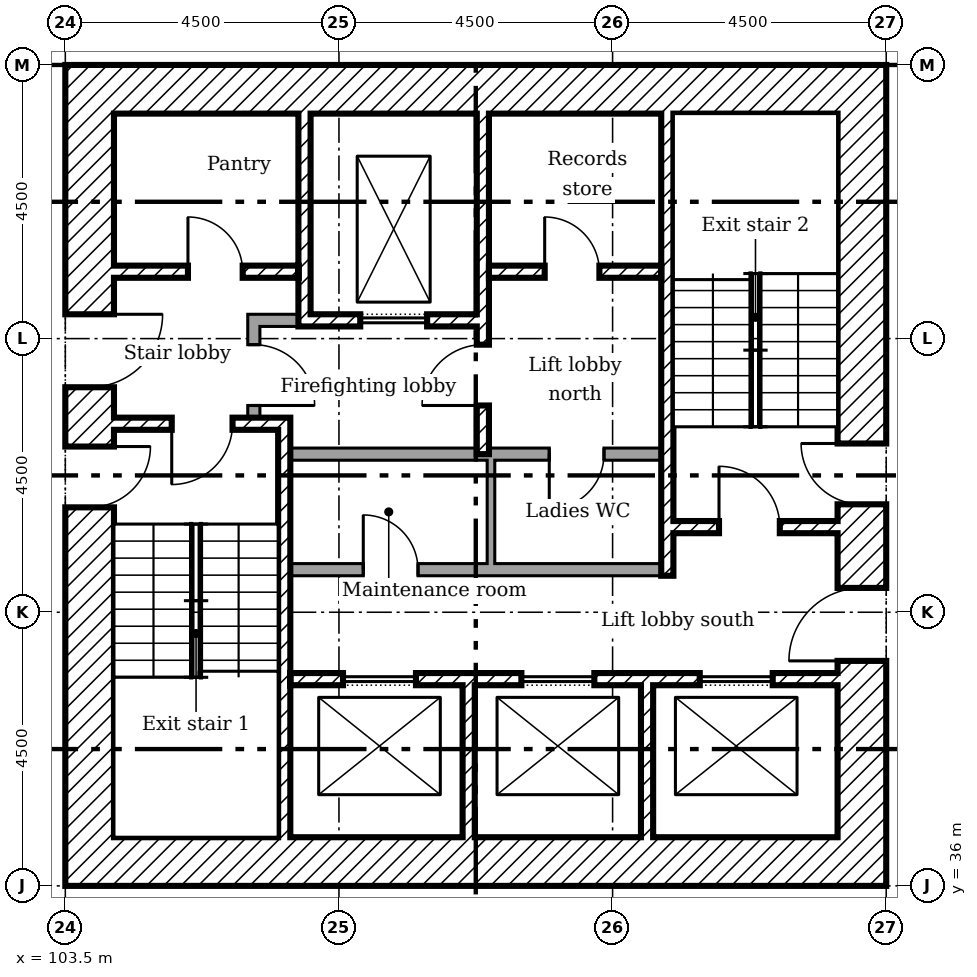
"""IFC4 building model, lengths in metres.
Left out: names, types, materials, properties, quantities, classifications, styles, units other than length and angle.
Written with IfcOpenShell. Run it as: python <this file> out.ifc"""

import sys

from ifc_helpers import new_model, si_unit, direction, frame, frame_2d, origin, place, context, subcontext, project, spatial, rectangle, extrude, element, fill, save


model = new_model("IFC4")
c1 = context("Model", 3, precision=1e-05, world=origin(), true_north=direction((0.0, 1.0)))
c2 = subcontext(c1, "Body", "Model", "MODEL_VIEW")
j1 = project(units=[si_unit("LENGTHUNIT", "METRE"), si_unit("PLANEANGLEUNIT", "RADIAN")], contexts=[c1])
p1 = place(None, origin())
s1 = spatial("IfcSite", under=j1, at=p1, CompositionType="ELEMENT")
p2 = place(p1, origin())
s2 = spatial("IfcBuilding", under=s1, at=p2, CompositionType="ELEMENT")
p3 = place(p2, frame((0.0, 0.0, 79.8)))
s3 = spatial("IfcBuildingStorey", under=s2, at=p3, CompositionType="ELEMENT", Elevation=79.8)
p4 = place(p3, frame((116.6, 36.0, 0.0), z_axis=(0.0, 0.0, 1.0), x_axis=(0.0, 1.0, 0.0)))
e1 = element("IfcWall", 1, at=p4, inside=s3, PredefinedType="SHEAR", context=c2, shape_type="SweptSolid", body=[
    extrude(rectangle(XDim=13.5, YDim=0.8, at=frame_2d((6.75, 0.0))), origin(), (0.0, 0.0, 1.0), 3.35),
])
p5 = place(p4, frame((3.7, 0.0, 0.0)))
e2 = element("IfcOpeningElement", 2, at=p5, cuts=e1, PredefinedType="OPENING", context=c2, shape_type="SweptSolid", body=[
    extrude(rectangle(XDim=1.2, YDim=2.1, at=frame_2d((0.6, 1.05))), frame((0.0, 0.41, 0.0), z_axis=(0.0, -1.0, 0.0), x_axis=(1.0, 0.0, 0.0)), (0.0, 0.0, 1.0), 0.82),
])
p6 = place(p4, frame((6.275, 0.0, 0.0)))
e3 = element("IfcOpeningElement", 3, at=p6, cuts=e1, PredefinedType="OPENING", context=c2, shape_type="SweptSolid", body=[
    extrude(rectangle(XDim=1.0, YDim=2.1, at=frame_2d((0.5, 1.05))), frame((0.0, 0.41, 0.0), z_axis=(0.0, -1.0, 0.0), x_axis=(1.0, 0.0, 0.0)), (0.0, 0.0, 1.0), 0.82),
])
for number, where in (
    (4, (104.3, 49.1, 0.0)),
    (5, (104.3, 36.4, 0.0)),
):
    element("IfcWall", number, at=place(p3, frame(where)), inside=s3, PredefinedType="SHEAR", context=c2, shape_type="SweptSolid", body=[
        extrude(rectangle(XDim=11.9, YDim=0.8, at=frame_2d((5.95, 0.0))), origin(), (0.0, 0.0, 1.0), 3.35),
    ])
p7 = place(p3, frame((103.9, 36.0, 0.0), z_axis=(0.0, 0.0, 1.0), x_axis=(0.0, 1.0, 0.0)))
e6 = element("IfcWall", 6, at=p7, inside=s3, PredefinedType="SHEAR", context=c2, shape_type="SweptSolid", body=[
    extrude(rectangle(XDim=13.5, YDim=0.8, at=frame_2d((6.75, 0.0))), origin(), (0.0, 0.0, 1.0), 3.35),
])
p8 = place(p7, frame((8.2, 0.0, 0.0)))
e7 = element("IfcOpeningElement", 7, at=p8, cuts=e6, PredefinedType="OPENING", context=c2, shape_type="SweptSolid", body=[
    extrude(rectangle(XDim=1.2, YDim=2.1, at=frame_2d((0.6, 1.05))), frame((0.0, 0.41, 0.0), z_axis=(0.0, -1.0, 0.0), x_axis=(1.0, 0.0, 0.0)), (0.0, 0.0, 1.0), 0.82),
])
p9 = place(p7, frame((6.225, 0.0, 0.0)))
e8 = element("IfcOpeningElement", 8, at=p9, cuts=e6, PredefinedType="OPENING", context=c2, shape_type="SweptSolid", body=[
    extrude(rectangle(XDim=1.0, YDim=2.1, at=frame_2d((0.5, 1.05))), frame((0.0, 0.41, 0.0), z_axis=(0.0, -1.0, 0.0), x_axis=(1.0, 0.0, 0.0)), (0.0, 0.0, 1.0), 0.82),
])
p10 = place(p3, frame((107.433, 48.7, 0.0), z_axis=(0.0, 0.0, 1.0), x_axis=(0.0, -1.0, 0.0)))
e9 = element("IfcWall", 9, at=p10, inside=s3, PredefinedType="SHEAR", context=c2, shape_type="SweptSolid", body=[
    extrude(rectangle(XDim=3.5, YDim=0.2, at=frame_2d((1.75, 0.0))), origin(), (0.0, 0.0, 1.0), 3.35),
])
p11 = place(p3, frame((110.367, 48.7, 0.0), z_axis=(0.0, 0.0, 1.0), x_axis=(0.0, -1.0, 0.0)))
e10 = element("IfcWall", 10, at=p11, inside=s3, PredefinedType="SHEAR", context=c2, shape_type="SweptSolid", body=[
    extrude(rectangle(XDim=5.6, YDim=0.2, at=frame_2d((2.8, 0.0))), origin(), (0.0, 0.0, 1.0), 3.35),
])
p12 = place(p11, frame((3.8, 0.0, 0.0)))
e11 = element("IfcOpeningElement", 11, at=p12, cuts=e10, PredefinedType="OPENING", context=c2, shape_type="SweptSolid", body=[
    extrude(rectangle(XDim=1.0, YDim=2.1, at=frame_2d((0.5, 1.05))), frame((0.0, 0.11, 0.0), z_axis=(0.0, -1.0, 0.0), x_axis=(1.0, 0.0, 0.0)), (0.0, 0.0, 1.0), 0.22),
])
for number, where, z_axis, x_axis in (
    (12, (110.133, 36.8, 0.0), (0.0, 0.0, 1.0), (0.0, 1.0, 0.0)),
    (13, (113.067, 36.8, 0.0), (0.0, 0.0, 1.0), (0.0, 1.0, 0.0)),
):
    element("IfcWall", number, at=place(p3, frame(where, z_axis=z_axis, x_axis=x_axis)), inside=s3, PredefinedType="SHEAR", context=c2, shape_type="SweptSolid", body=[
        extrude(rectangle(XDim=2.5, YDim=0.2, at=frame_2d((1.25, 0.0))), origin(), (0.0, 0.0, 1.0), 3.35),
    ])
p13 = place(p3, frame((106.5, 45.3, 0.0)))
e14 = element("IfcWall", 14, at=p13, inside=s3, PredefinedType="PARTITIONING", context=c2, shape_type="SweptSolid", body=[
    extrude(rectangle(XDim=0.833, YDim=0.2, at=frame_2d((0.417, 0.0))), origin(), (0.0, 0.0, 1.0), 3.35),
])
p14 = place(p3, frame((106.6, 43.7, 0.0), z_axis=(0.0, 0.0, 1.0), x_axis=(0.0, 1.0, 0.0)))
e15 = element("IfcWall", 15, at=p14, inside=s3, PredefinedType="PARTITIONING", context=c2, shape_type="SweptSolid", body=[
    extrude(rectangle(XDim=1.5, YDim=0.2, at=frame_2d((0.75, 0.0))), origin(), (0.0, 0.0, 1.0), 3.35),
])
p15 = place(p14, frame((0.2, 0.0, 0.0)))
e16 = element("IfcOpeningElement", 16, at=p15, cuts=e15, PredefinedType="OPENING", context=c2, shape_type="SweptSolid", body=[
    extrude(rectangle(XDim=1.0, YDim=2.1, at=frame_2d((0.5, 1.05))), frame((0.0, 0.11, 0.0), z_axis=(0.0, -1.0, 0.0), x_axis=(1.0, 0.0, 0.0)), (0.0, 0.0, 1.0), 0.22),
])
p16 = place(p3, frame((104.3, 46.1, 0.0)))
e17 = element("IfcWall", 17, at=p16, inside=s3, PredefinedType="SHEAR", context=c2, shape_type="SweptSolid", body=[
    extrude(rectangle(XDim=3.033, YDim=0.2, at=frame_2d((1.517, 0.0))), origin(), (0.0, 0.0, 1.0), 3.35),
])
p17 = place(p16, frame((1.217, 0.0, 0.0)))
e18 = element("IfcOpeningElement", 18, at=p17, cuts=e17, PredefinedType="OPENING", context=c2, shape_type="SweptSolid", body=[
    extrude(rectangle(XDim=0.9, YDim=2.1, at=frame_2d((0.45, 1.05))), frame((0.0, 0.11, 0.0), z_axis=(0.0, -1.0, 0.0), x_axis=(1.0, 0.0, 0.0)), (0.0, 0.0, 1.0), 0.22),
])
p18 = place(p3, frame((110.467, 46.1, 0.0)))
e19 = element("IfcWall", 19, at=p18, inside=s3, PredefinedType="SHEAR", context=c2, shape_type="SweptSolid", body=[
    extrude(rectangle(XDim=2.833, YDim=0.2, at=frame_2d((1.417, 0.0))), origin(), (0.0, 0.0, 1.0), 3.35),
])
p19 = place(p18, frame((0.917, 0.0, 0.0)))
e20 = element("IfcOpeningElement", 20, at=p19, cuts=e19, PredefinedType="OPENING", context=c2, shape_type="SweptSolid", body=[
    extrude(rectangle(XDim=0.9, YDim=2.1, at=frame_2d((0.45, 1.05))), frame((0.0, 0.11, 0.0), z_axis=(0.0, -1.0, 0.0), x_axis=(1.0, 0.0, 0.0)), (0.0, 0.0, 1.0), 0.22),
])
p20 = place(p3, frame((107.533, 45.3, 0.0)))
e21 = element("IfcWall", 21, at=p20, inside=s3, PredefinedType="SHEAR", context=c2, shape_type="SweptSolid", body=[
    extrude(rectangle(XDim=2.733, YDim=0.2, at=frame_2d((1.367, 0.0))), origin(), (0.0, 0.0, 1.0), 3.35),
])
p21 = place(p20, frame((0.817, 0.0, 0.0)))
e22 = element("IfcOpeningElement", 22, at=p21, cuts=e21, PredefinedType="OPENING", context=c2, shape_type="SweptSolid", body=[
    extrude(rectangle(XDim=1.1, YDim=2.1, at=frame_2d((0.55, 1.05))), frame((0.0, 0.11, 0.0), z_axis=(0.0, -1.0, 0.0), x_axis=(1.0, 0.0, 0.0)), (0.0, 0.0, 1.0), 0.22),
])
p22 = place(p3, frame((107.2, 39.4, 0.0)))
e23 = element("IfcWall", 23, at=p22, inside=s3, PredefinedType="SHEAR", context=c2, shape_type="SweptSolid", body=[
    extrude(rectangle(XDim=9.0, YDim=0.2, at=frame_2d((4.5, 0.0))), origin(), (0.0, 0.0, 1.0), 3.35),
])
p23 = place(p22, frame((0.867, 0.0, 0.0)))
e24 = element("IfcOpeningElement", 24, at=p23, cuts=e23, PredefinedType="OPENING", context=c2, shape_type="SweptSolid", body=[
    extrude(rectangle(XDim=1.2, YDim=2.1, at=frame_2d((0.6, 1.05))), frame((0.0, 0.11, 0.0), z_axis=(0.0, -1.0, 0.0), x_axis=(1.0, 0.0, 0.0)), (0.0, 0.0, 1.0), 0.22),
])
p24 = place(p22, frame((3.8, 0.0, 0.0)))
e25 = element("IfcOpeningElement", 25, at=p24, cuts=e23, PredefinedType="OPENING", context=c2, shape_type="SweptSolid", body=[
    extrude(rectangle(XDim=1.2, YDim=2.1, at=frame_2d((0.6, 1.05))), frame((0.0, 0.11, 0.0), z_axis=(0.0, -1.0, 0.0), x_axis=(1.0, 0.0, 0.0)), (0.0, 0.0, 1.0), 0.22),
])
p25 = place(p22, frame((6.733, 0.0, 0.0)))
e26 = element("IfcOpeningElement", 26, at=p25, cuts=e23, PredefinedType="OPENING", context=c2, shape_type="SweptSolid", body=[
    extrude(rectangle(XDim=1.2, YDim=2.1, at=frame_2d((0.6, 1.05))), frame((0.0, 0.11, 0.0), z_axis=(0.0, -1.0, 0.0), x_axis=(1.0, 0.0, 0.0)), (0.0, 0.0, 1.0), 0.22),
])
p26 = place(p3, frame((107.1, 36.8, 0.0), z_axis=(0.0, 0.0, 1.0), x_axis=(0.0, 1.0, 0.0)))
e27 = element("IfcWall", 27, at=p26, inside=s3, PredefinedType="SHEAR", context=c2, shape_type="SweptSolid", body=[
    extrude(rectangle(XDim=6.9, YDim=0.2, at=frame_2d((3.45, 0.0))), origin(), (0.0, 0.0, 1.0), 3.35),
])
p27 = place(p3, frame((104.3, 43.6, 0.0)))
e28 = element("IfcWall", 28, at=p27, inside=s3, PredefinedType="SHEAR", context=c2, shape_type="SweptSolid", body=[
    extrude(rectangle(XDim=2.7, YDim=0.2, at=frame_2d((1.35, 0.0))), origin(), (0.0, 0.0, 1.0), 3.35),
])
p28 = place(p27, frame((0.95, 0.0, 0.0)))
e29 = element("IfcOpeningElement", 29, at=p28, cuts=e28, PredefinedType="OPENING", context=c2, shape_type="SweptSolid", body=[
    extrude(rectangle(XDim=1.0, YDim=2.1, at=frame_2d((0.5, 1.05))), frame((0.0, 0.11, 0.0), z_axis=(0.0, -1.0, 0.0), x_axis=(1.0, 0.0, 0.0)), (0.0, 0.0, 1.0), 0.22),
])
p29 = place(p3, frame((113.5, 41.9, 0.0)))
e30 = element("IfcWall", 30, at=p29, inside=s3, PredefinedType="SHEAR", context=c2, shape_type="SweptSolid", body=[
    extrude(rectangle(XDim=2.7, YDim=0.2, at=frame_2d((1.35, 0.0))), origin(), (0.0, 0.0, 1.0), 3.35),
])
p30 = place(p29, frame((0.75, 0.0, 0.0)))
e31 = element("IfcOpeningElement", 31, at=p30, cuts=e30, PredefinedType="OPENING", context=c2, shape_type="SweptSolid", body=[
    extrude(rectangle(XDim=1.0, YDim=2.1, at=frame_2d((0.5, 1.05))), frame((0.0, 0.11, 0.0), z_axis=(0.0, -1.0, 0.0), x_axis=(1.0, 0.0, 0.0)), (0.0, 0.0, 1.0), 0.22),
])
p31 = place(p3, frame((113.4, 41.1, 0.0), z_axis=(0.0, 0.0, 1.0), x_axis=(0.0, 1.0, 0.0)))
e32 = element("IfcWall", 32, at=p31, inside=s3, PredefinedType="SHEAR", context=c2, shape_type="SweptSolid", body=[
    extrude(rectangle(XDim=7.6, YDim=0.2, at=frame_2d((3.8, 0.0))), origin(), (0.0, 0.0, 1.0), 3.35),
])
p32 = place(p3, frame((107.2, 43.1, 0.0)))
e33 = element("IfcWall", 33, at=p32, inside=s3, PredefinedType="PARTITIONING", context=c2, shape_type="SweptSolid", body=[
    extrude(rectangle(XDim=6.1, YDim=0.2, at=frame_2d((3.05, 0.0))), origin(), (0.0, 0.0, 1.0), 3.35),
])
p33 = place(p32, frame((4.259, 0.0, 0.0)))
e34 = element("IfcOpeningElement", 34, at=p33, cuts=e33, PredefinedType="OPENING", context=c2, shape_type="SweptSolid", body=[
    extrude(rectangle(XDim=0.9, YDim=2.1, at=frame_2d((0.45, 1.05))), frame((0.0, 0.11, 0.0), z_axis=(0.0, -1.0, 0.0), x_axis=(1.0, 0.0, 0.0)), (0.0, 0.0, 1.0), 0.22),
])
p34 = place(p3, frame((107.2, 41.2, 0.0)))
e35 = element("IfcWall", 35, at=p34, inside=s3, PredefinedType="PARTITIONING", context=c2, shape_type="SweptSolid", body=[
    extrude(rectangle(XDim=6.1, YDim=0.2, at=frame_2d((3.05, 0.0))), origin(), (0.0, 0.0, 1.0), 3.35),
])
p35 = place(p34, frame((1.2, 0.0, 0.0)))
e36 = element("IfcOpeningElement", 36, at=p35, cuts=e35, PredefinedType="OPENING", context=c2, shape_type="SweptSolid", body=[
    extrude(rectangle(XDim=0.9, YDim=2.1, at=frame_2d((0.45, 1.05))), frame((0.0, 0.11, 0.0), z_axis=(0.0, -1.0, 0.0), x_axis=(1.0, 0.0, 0.0)), (0.0, 0.0, 1.0), 0.22),
])
p36 = place(p3, frame((110.5, 41.3, 0.0), z_axis=(0.0, 0.0, 1.0), x_axis=(0.0, 1.0, 0.0)))
e37 = element("IfcWall", 37, at=p36, inside=s3, PredefinedType="PARTITIONING", context=c2, shape_type="SweptSolid", body=[
    extrude(rectangle(XDim=1.7, YDim=0.125, at=frame_2d((0.85, 0.0))), origin(), (0.0, 0.0, 1.0), 3.35),
])
p37 = place(p8, frame((1.2, 0.0, 0.0), x_axis=(-1.0, 0.0, 0.0)))
e38 = element("IfcDoor", 38, at=p37, inside=s3, OperationType="SINGLE_SWING_RIGHT", PredefinedType="DOOR", context=c2, shape_type="SweptSolid", body=[
    extrude(rectangle(XDim=1.2, YDim=2.1, at=frame_2d((0.6, 1.05))), frame((0.0, 0.025, 0.0), z_axis=(0.0, -1.0, 0.0), x_axis=(1.0, 0.0, 0.0)), (0.0, 0.0, 1.0), 0.05),
])
fill(e7, e38)
p38 = place(p5, origin())
e39 = element("IfcDoor", 39, at=p38, inside=s3, OperationType="SINGLE_SWING_RIGHT", PredefinedType="DOOR", context=c2, shape_type="SweptSolid", body=[
    extrude(rectangle(XDim=1.2, YDim=2.1, at=frame_2d((0.6, 1.05))), frame((0.0, 0.025, 0.0), z_axis=(0.0, -1.0, 0.0), x_axis=(1.0, 0.0, 0.0)), (0.0, 0.0, 1.0), 0.05),
])
fill(e2, e39)
p39 = place(p28, frame((1.0, 0.0, 0.0), x_axis=(-1.0, 0.0, 0.0)))
e40 = element("IfcDoor", 40, at=p39, inside=s3, OperationType="SINGLE_SWING_LEFT", PredefinedType="DOOR", context=c2, shape_type="SweptSolid", body=[
    extrude(rectangle(XDim=1.0, YDim=2.1, at=frame_2d((0.5, 1.05))), frame((0.0, 0.025, 0.0), z_axis=(0.0, -1.0, 0.0), x_axis=(1.0, 0.0, 0.0)), (0.0, 0.0, 1.0), 0.05),
])
fill(e29, e40)
p40 = place(p9, frame((1.0, 0.0, 0.0), x_axis=(-1.0, 0.0, 0.0)))
e41 = element("IfcDoor", 41, at=p40, inside=s3, OperationType="SINGLE_SWING_RIGHT", PredefinedType="DOOR", context=c2, shape_type="SweptSolid", body=[
    extrude(rectangle(XDim=1.0, YDim=2.1, at=frame_2d((0.5, 1.05))), frame((0.0, 0.025, 0.0), z_axis=(0.0, -1.0, 0.0), x_axis=(1.0, 0.0, 0.0)), (0.0, 0.0, 1.0), 0.05),
])
fill(e8, e41)
p41 = place(p30, origin())
e42 = element("IfcDoor", 42, at=p41, inside=s3, OperationType="SINGLE_SWING_RIGHT", PredefinedType="DOOR", context=c2, shape_type="SweptSolid", body=[
    extrude(rectangle(XDim=1.0, YDim=2.1, at=frame_2d((0.5, 1.05))), frame((0.0, 0.025, 0.0), z_axis=(0.0, -1.0, 0.0), x_axis=(1.0, 0.0, 0.0)), (0.0, 0.0, 1.0), 0.05),
])
fill(e31, e42)
p42 = place(p6, origin())
e43 = element("IfcDoor", 43, at=p42, inside=s3, OperationType="SINGLE_SWING_LEFT", PredefinedType="DOOR", context=c2, shape_type="SweptSolid", body=[
    extrude(rectangle(XDim=1.0, YDim=2.1, at=frame_2d((0.5, 1.05))), frame((0.0, 0.025, 0.0), z_axis=(0.0, -1.0, 0.0), x_axis=(1.0, 0.0, 0.0)), (0.0, 0.0, 1.0), 0.05),
])
fill(e3, e43)
p43 = place(p12, frame((1.0, 0.0, 0.0), x_axis=(-1.0, 0.0, 0.0)))
e44 = element("IfcDoor", 44, at=p43, inside=s3, OperationType="SINGLE_SWING_RIGHT", PredefinedType="DOOR", context=c2, shape_type="SweptSolid", body=[
    extrude(rectangle(XDim=1.0, YDim=2.1, at=frame_2d((0.5, 1.05))), frame((0.0, 0.025, 0.0), z_axis=(0.0, -1.0, 0.0), x_axis=(1.0, 0.0, 0.0)), (0.0, 0.0, 1.0), 0.05),
])
fill(e11, e44)
p44 = place(p15, frame((1.0, 0.0, 0.0), x_axis=(-1.0, 0.0, 0.0)))
e45 = element("IfcDoor", 45, at=p44, inside=s3, OperationType="SINGLE_SWING_LEFT", PredefinedType="DOOR", context=c2, shape_type="SweptSolid", body=[
    extrude(rectangle(XDim=1.0, YDim=2.1, at=frame_2d((0.5, 1.05))), frame((0.0, 0.025, 0.0), z_axis=(0.0, -1.0, 0.0), x_axis=(1.0, 0.0, 0.0)), (0.0, 0.0, 1.0), 0.05),
])
fill(e16, e45)
p45 = place(p17, origin())
e46 = element("IfcDoor", 46, at=p45, inside=s3, OperationType="SINGLE_SWING_RIGHT", PredefinedType="DOOR", context=c2, shape_type="SweptSolid", body=[
    extrude(rectangle(XDim=0.9, YDim=2.1, at=frame_2d((0.45, 1.05))), frame((0.0, 0.025, 0.0), z_axis=(0.0, -1.0, 0.0), x_axis=(1.0, 0.0, 0.0)), (0.0, 0.0, 1.0), 0.05),
])
fill(e18, e46)
p46 = place(p19, origin())
e47 = element("IfcDoor", 47, at=p46, inside=s3, OperationType="SINGLE_SWING_RIGHT", PredefinedType="DOOR", context=c2, shape_type="SweptSolid", body=[
    extrude(rectangle(XDim=0.9, YDim=2.1, at=frame_2d((0.45, 1.05))), frame((0.0, 0.025, 0.0), z_axis=(0.0, -1.0, 0.0), x_axis=(1.0, 0.0, 0.0)), (0.0, 0.0, 1.0), 0.05),
])
fill(e20, e47)
p47 = place(p35, origin())
e48 = element("IfcDoor", 48, at=p47, inside=s3, OperationType="SINGLE_SWING_RIGHT", PredefinedType="DOOR", context=c2, shape_type="SweptSolid", body=[
    extrude(rectangle(XDim=0.9, YDim=2.1, at=frame_2d((0.45, 1.05))), frame((0.0, 0.025, 0.0), z_axis=(0.0, -1.0, 0.0), x_axis=(1.0, 0.0, 0.0)), (0.0, 0.0, 1.0), 0.05),
])
fill(e36, e48)
p48 = place(p33, frame((0.9, 0.0, 0.0), x_axis=(-1.0, 0.0, 0.0)))
e49 = element("IfcDoor", 49, at=p48, inside=s3, OperationType="SINGLE_SWING_LEFT", PredefinedType="DOOR", context=c2, shape_type="SweptSolid", body=[
    extrude(rectangle(XDim=0.9, YDim=2.1, at=frame_2d((0.45, 1.05))), frame((0.0, 0.025, 0.0), z_axis=(0.0, -1.0, 0.0), x_axis=(1.0, 0.0, 0.0)), (0.0, 0.0, 1.0), 0.05),
])
fill(e34, e49)
p49 = place(p21, origin())
e50 = element("IfcDoor", 50, at=p49, inside=s3, OperationType="SLIDING_TO_LEFT", PredefinedType="DOOR", context=c2, shape_type="SweptSolid", body=[
    extrude(rectangle(XDim=1.1, YDim=2.1, at=frame_2d((0.55, 1.05))), frame((0.0, 0.025, 0.0), z_axis=(0.0, -1.0, 0.0), x_axis=(1.0, 0.0, 0.0)), (0.0, 0.0, 1.0), 0.05),
])
fill(e22, e50)
p50 = place(p23, origin())
e51 = element("IfcDoor", 51, at=p50, inside=s3, OperationType="SLIDING_TO_LEFT", PredefinedType="DOOR", context=c2, shape_type="SweptSolid", body=[
    extrude(rectangle(XDim=1.2, YDim=2.1, at=frame_2d((0.6, 1.05))), frame((0.0, 0.025, 0.0), z_axis=(0.0, -1.0, 0.0), x_axis=(1.0, 0.0, 0.0)), (0.0, 0.0, 1.0), 0.05),
])
fill(e24, e51)
p51 = place(p24, origin())
e52 = element("IfcDoor", 52, at=p51, inside=s3, OperationType="SLIDING_TO_LEFT", PredefinedType="DOOR", context=c2, shape_type="SweptSolid", body=[
    extrude(rectangle(XDim=1.2, YDim=2.1, at=frame_2d((0.6, 1.05))), frame((0.0, 0.025, 0.0), z_axis=(0.0, -1.0, 0.0), x_axis=(1.0, 0.0, 0.0)), (0.0, 0.0, 1.0), 0.05),
])
fill(e25, e52)
p52 = place(p25, origin())
e53 = element("IfcDoor", 53, at=p52, inside=s3, OperationType="SLIDING_TO_LEFT", PredefinedType="DOOR", context=c2, shape_type="SweptSolid", body=[
    extrude(rectangle(XDim=1.2, YDim=2.1, at=frame_2d((0.6, 1.05))), frame((0.0, 0.025, 0.0), z_axis=(0.0, -1.0, 0.0), x_axis=(1.0, 0.0, 0.0)), (0.0, 0.0, 1.0), 0.05),
])
fill(e26, e53)
save(model, sys.argv[1])
